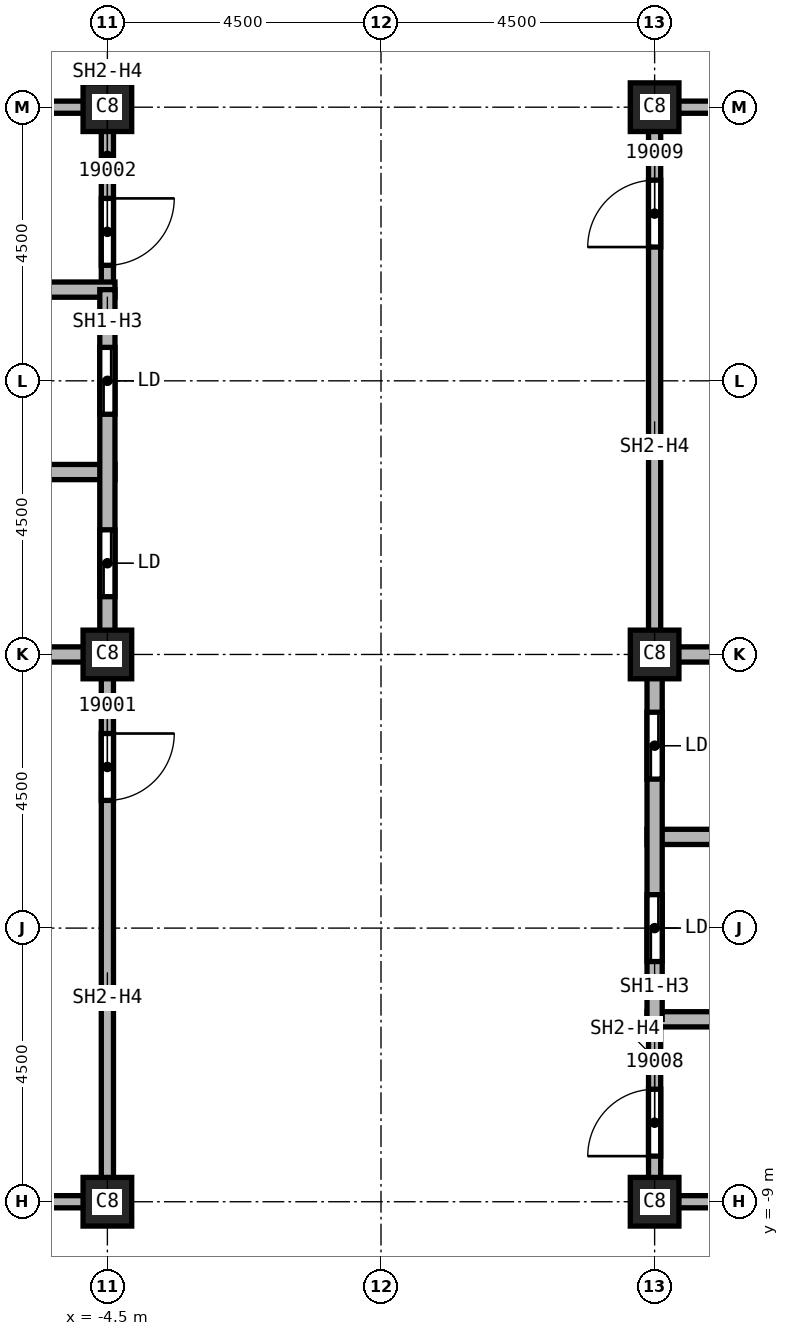
"""IFC4 building model, lengths in metres.
Left out: names, types, materials, properties, quantities, classifications, styles, units other than length and angle.
Written with IfcOpenShell. Run it as: python <this file> out.ifc"""

import sys

from ifc_helpers import new_model, si_unit, direction, frame, frame_2d, origin, origin_2d, place, context, subcontext, project, spatial, rectangle, extrude, element, fill, save


model = new_model("IFC4")
c1 = context("Model", 3, precision=1e-05, world=origin(), true_north=direction((0.0, 1.0)))
c2 = subcontext(c1, "Body", "Model", "MODEL_VIEW")
j1 = project(units=[si_unit("LENGTHUNIT", "METRE"), si_unit("PLANEANGLEUNIT", "RADIAN")], contexts=[c1])
p1 = place(None, origin())
s1 = spatial("IfcSite", under=j1, at=p1, CompositionType="ELEMENT")
p2 = place(p1, origin())
s2 = spatial("IfcBuilding", under=s1, at=p2, CompositionType="ELEMENT")
p3 = place(p2, frame((0.0, 0.0, 278.0)))
s3 = spatial("IfcBuildingStorey", under=s2, at=p3, CompositionType="ELEMENT", Elevation=278.0)
for number, where, z_axis, x_axis in (
    (1, (4.5, 0.0, 0.0), (0.0, 0.0, 1.0), (1.0, 0.0, 0.0)),
    (2, (4.5, 9.0, 0.0), (0.0, 0.0, 1.0), (1.0, 0.0, 0.0)),
    (3, (4.5, -9.0, 0.0), (0.0, 0.0, 1.0), (1.0, 0.0, 0.0)),
    (4, (-4.5, 0.0, 0.0), (0.0, 0.0, 1.0), (1.0, 0.0, 0.0)),
    (5, (-4.5, 9.0, 0.0), (0.0, 0.0, 1.0), (1.0, 0.0, 0.0)),
    (6, (-4.5, -9.0, 0.0), (0.0, 0.0, 1.0), (1.0, 0.0, 0.0)),
):
    element("IfcColumn", number, at=place(p3, frame(where, z_axis=z_axis, x_axis=x_axis)), inside=s3, PredefinedType="COLUMN", context=c2, shape_type="SweptSolid", body=[
        extrude(rectangle(XDim=0.8, YDim=0.8, at=origin_2d()), origin(), (0.0, 0.0, 1.0), 3.72),
    ])
for number, where, z_axis, x_axis in (
    (7, (-7.5, 9.0, 0.0), (0.0, 0.0, 1.0), (1.0, 0.0, 0.0)),
    (8, (-4.5, -9.0, 0.0), (0.0, 0.0, 1.0), (-1.0, 0.0, 0.0)),
):
    element("IfcWall", number, at=place(p3, frame(where, z_axis=z_axis, x_axis=x_axis)), inside=s3, PredefinedType="SOLIDWALL", context=c2, shape_type="SweptSolid", body=[
        extrude(rectangle(XDim=3.0, YDim=0.2, at=frame_2d((1.5, 0.0))), origin(), (0.0, 0.0, 1.0), 3.042),
    ])
p4 = place(p3, frame((-4.5, 0.0, 0.0), z_axis=(0.0, 0.0, 1.0), x_axis=(0.0, -1.0, 0.0)))
e9 = element("IfcWall", 9, at=p4, inside=s3, PredefinedType="SOLIDWALL", context=c2, shape_type="SweptSolid", body=[
    extrude(rectangle(XDim=9.1, YDim=0.2, at=frame_2d((4.55, 0.0))), origin(), (0.0, 0.0, 1.0), 3.042),
])
p5 = place(p4, frame((1.3, 0.0, 0.0)))
e10 = element("IfcOpeningElement", 10, at=p5, cuts=e9, PredefinedType="OPENING", context=c2, shape_type="SweptSolid", body=[
    extrude(rectangle(XDim=1.1, YDim=2.1, at=frame_2d((0.55, 1.05))), frame((0.0, 0.1, 0.0), z_axis=(0.0, -1.0, 0.0), x_axis=(1.0, 0.0, 0.0)), (0.0, 0.0, 1.0), 0.2),
])
p6 = place(p3, frame((-4.5, 9.1, 0.0), z_axis=(0.0, 0.0, 1.0), x_axis=(0.0, -1.0, 0.0)))
e11 = element("IfcWall", 11, at=p6, inside=s3, PredefinedType="SOLIDWALL", context=c2, shape_type="SweptSolid", body=[
    extrude(rectangle(XDim=3.1, YDim=0.2, at=frame_2d((1.55, 0.0))), origin(), (0.0, 0.0, 1.0), 3.042),
])
p7 = place(p6, frame((1.6, 0.0, 0.0)))
e12 = element("IfcOpeningElement", 12, at=p7, cuts=e11, PredefinedType="OPENING", context=c2, shape_type="SweptSolid", body=[
    extrude(rectangle(XDim=1.1, YDim=2.1, at=frame_2d((0.55, 1.05))), frame((0.0, 0.1, 0.0), z_axis=(0.0, -1.0, 0.0), x_axis=(1.0, 0.0, 0.0)), (0.0, 0.0, 1.0), 0.2),
])
p8 = place(p3, frame((4.5, -9.1, 0.0), z_axis=(0.0, 0.0, 1.0), x_axis=(0.0, 1.0, 0.0)))
e13 = element("IfcWall", 13, at=p8, inside=s3, PredefinedType="SOLIDWALL", context=c2, shape_type="SweptSolid", body=[
    extrude(rectangle(XDim=3.1, YDim=0.2, at=frame_2d((1.55, 0.0))), origin(), (0.0, 0.0, 1.0), 3.042),
])
p9 = place(p8, frame((0.85, 0.0, 0.0)))
e14 = element("IfcOpeningElement", 14, at=p9, cuts=e13, PredefinedType="OPENING", context=c2, shape_type="SweptSolid", body=[
    extrude(rectangle(XDim=1.1, YDim=2.1, at=frame_2d((0.55, 1.05))), frame((0.0, 0.1, 0.0), z_axis=(0.0, -1.0, 0.0), x_axis=(1.0, 0.0, 0.0)), (0.0, 0.0, 1.0), 0.2),
])
p10 = place(p3, frame((4.5, 0.0, 0.0), z_axis=(0.0, 0.0, 1.0), x_axis=(0.0, 1.0, 0.0)))
e15 = element("IfcWall", 15, at=p10, inside=s3, PredefinedType="SOLIDWALL", context=c2, shape_type="SweptSolid", body=[
    extrude(rectangle(XDim=9.1, YDim=0.2, at=frame_2d((4.55, 0.0))), origin(), (0.0, 0.0, 1.0), 3.042),
])
p11 = place(p10, frame((6.7, 0.0, 0.0)))
e16 = element("IfcOpeningElement", 16, at=p11, cuts=e15, PredefinedType="OPENING", context=c2, shape_type="SweptSolid", body=[
    extrude(rectangle(XDim=1.1, YDim=2.1, at=frame_2d((0.55, 1.05))), frame((0.0, 0.1, 0.0), z_axis=(0.0, -1.0, 0.0), x_axis=(1.0, 0.0, 0.0)), (0.0, 0.0, 1.0), 0.2),
])
for number, where, z_axis, x_axis in (
    (17, (4.5, 9.0, 0.0), (0.0, 0.0, 1.0), (1.0, 0.0, 0.0)),
    (18, (7.5, -9.0, 0.0), (0.0, 0.0, 1.0), (-1.0, 0.0, 0.0)),
):
    element("IfcWall", number, at=place(p3, frame(where, z_axis=z_axis, x_axis=x_axis)), inside=s3, PredefinedType="SOLIDWALL", context=c2, shape_type="SweptSolid", body=[
        extrude(rectangle(XDim=3.0, YDim=0.2, at=frame_2d((1.5, 0.0))), origin(), (0.0, 0.0, 1.0), 3.042),
    ])
p12 = place(p3, frame((-13.625, 3.0, 0.0), z_axis=(0.0, 0.0, 1.0), x_axis=(1.0, 0.0, 0.0)))
e19 = element("IfcWall", 19, at=p12, inside=s3, PredefinedType="SOLIDWALL", context=c2, shape_type="SweptSolid", body=[
    extrude(rectangle(XDim=9.25, YDim=0.25, at=frame_2d((4.625, 0.0))), origin(), (0.0, 0.0, 1.0), 3.72),
])
p13 = place(p12, frame((3.25, 0.0, 0.0)))
e20 = element("IfcOpeningElement", 20, at=p13, cuts=e19, PredefinedType="OPENING", context=c2, shape_type="SweptSolid", body=[
    extrude(rectangle(XDim=1.1, YDim=2.1, at=frame_2d((0.55, 1.05))), frame((0.0, 0.125, 0.0), z_axis=(0.0, -1.0, 0.0), x_axis=(1.0, 0.0, 0.0)), (0.0, 0.0, 1.0), 0.25),
])
for number, where, z_axis, x_axis in (
    (21, (-7.625, 0.0, 0.0), (0.0, 0.0, 1.0), (1.0, 0.0, 0.0)),
    (22, (-7.625, 6.0, 0.0), (0.0, 0.0, 1.0), (1.0, 0.0, 0.0)),
):
    element("IfcWall", number, at=place(p3, frame(where, z_axis=z_axis, x_axis=x_axis)), inside=s3, PredefinedType="SOLIDWALL", context=c2, shape_type="SweptSolid", body=[
        extrude(rectangle(XDim=3.25, YDim=0.25, at=frame_2d((1.625, 0.0))), origin(), (0.0, 0.0, 1.0), 3.72),
    ])
p14 = place(p3, frame((-4.5, 6.0, 0.0), z_axis=(0.0, 0.0, 1.0), x_axis=(0.0, -1.0, 0.0)))
e23 = element("IfcWall", 23, at=p14, inside=s3, PredefinedType="SOLIDWALL", context=c2, shape_type="SweptSolid", body=[
    extrude(rectangle(XDim=6.0, YDim=0.25, at=frame_2d((3.0, 0.0))), origin(), (0.0, 0.0, 1.0), 3.042),
])
p15 = place(p14, frame((3.95, 0.0, 0.0)))
e24 = element("IfcOpeningElement", 24, at=p15, cuts=e23, PredefinedType="OPENING", context=c2, shape_type="SweptSolid", body=[
    extrude(rectangle(XDim=1.1, YDim=2.1, at=frame_2d((0.55, 1.05))), frame((0.0, 0.125, 0.0), z_axis=(0.0, -1.0, 0.0), x_axis=(1.0, 0.0, 0.0)), (0.0, 0.0, 1.0), 0.25),
])
p16 = place(p14, frame((0.95, 0.0, 0.0)))
e25 = element("IfcOpeningElement", 25, at=p16, cuts=e23, PredefinedType="OPENING", context=c2, shape_type="SweptSolid", body=[
    extrude(rectangle(XDim=1.1, YDim=2.1, at=frame_2d((0.55, 1.05))), frame((0.0, 0.125, 0.0), z_axis=(0.0, -1.0, 0.0), x_axis=(1.0, 0.0, 0.0)), (0.0, 0.0, 1.0), 0.25),
])
p17 = place(p3, frame((4.375, -6.0, 0.0), z_axis=(0.0, 0.0, 1.0), x_axis=(1.0, 0.0, 0.0)))
e26 = element("IfcWall", 26, at=p17, inside=s3, PredefinedType="SOLIDWALL", context=c2, shape_type="SweptSolid", body=[
    extrude(rectangle(XDim=3.25, YDim=0.25, at=frame_2d((1.625, 0.0))), origin(), (0.0, 0.0, 1.0), 3.72),
])
p18 = place(p3, frame((4.375, -3.0, 0.0), z_axis=(0.0, 0.0, 1.0), x_axis=(1.0, 0.0, 0.0)))
e27 = element("IfcWall", 27, at=p18, inside=s3, PredefinedType="SOLIDWALL", context=c2, shape_type="SweptSolid", body=[
    extrude(rectangle(XDim=9.25, YDim=0.25, at=frame_2d((4.625, 0.0))), origin(), (0.0, 0.0, 1.0), 3.72),
])
p19 = place(p18, frame((4.875, 0.0, 0.0)))
e28 = element("IfcOpeningElement", 28, at=p19, cuts=e27, PredefinedType="OPENING", context=c2, shape_type="SweptSolid", body=[
    extrude(rectangle(XDim=1.1, YDim=2.1, at=frame_2d((0.55, 1.05))), frame((0.0, 0.125, 0.0), z_axis=(0.0, -1.0, 0.0), x_axis=(1.0, 0.0, 0.0)), (0.0, 0.0, 1.0), 0.25),
])
p20 = place(p3, frame((4.375, 0.0, 0.0), z_axis=(0.0, 0.0, 1.0), x_axis=(1.0, 0.0, 0.0)))
e29 = element("IfcWall", 29, at=p20, inside=s3, PredefinedType="SOLIDWALL", context=c2, shape_type="SweptSolid", body=[
    extrude(rectangle(XDim=3.25, YDim=0.25, at=frame_2d((1.625, 0.0))), origin(), (0.0, 0.0, 1.0), 3.72),
])
p21 = place(p3, frame((4.5, -6.0, 0.0), z_axis=(0.0, 0.0, 1.0), x_axis=(0.0, 1.0, 0.0)))
e30 = element("IfcWall", 30, at=p21, inside=s3, PredefinedType="SOLIDWALL", context=c2, shape_type="SweptSolid", body=[
    extrude(rectangle(XDim=6.0, YDim=0.25, at=frame_2d((3.0, 0.0))), origin(), (0.0, 0.0, 1.0), 3.042),
])
p22 = place(p21, frame((0.95, 0.0, 0.0)))
e31 = element("IfcOpeningElement", 31, at=p22, cuts=e30, PredefinedType="OPENING", context=c2, shape_type="SweptSolid", body=[
    extrude(rectangle(XDim=1.1, YDim=2.1, at=frame_2d((0.55, 1.05))), frame((0.0, 0.125, 0.0), z_axis=(0.0, -1.0, 0.0), x_axis=(1.0, 0.0, 0.0)), (0.0, 0.0, 1.0), 0.25),
])
p23 = place(p21, frame((3.95, 0.0, 0.0)))
e32 = element("IfcOpeningElement", 32, at=p23, cuts=e30, PredefinedType="OPENING", context=c2, shape_type="SweptSolid", body=[
    extrude(rectangle(XDim=1.1, YDim=2.1, at=frame_2d((0.55, 1.05))), frame((0.0, 0.125, 0.0), z_axis=(0.0, -1.0, 0.0), x_axis=(1.0, 0.0, 0.0)), (0.0, 0.0, 1.0), 0.25),
])
p24 = place(p5, origin())
e33 = element("IfcDoor", 33, at=p24, inside=s3, OperationType="SINGLE_SWING_RIGHT", PredefinedType="DOOR", context=c2, shape_type="SweptSolid", body=[
    extrude(rectangle(XDim=1.1, YDim=2.1, at=frame_2d((0.55, 1.05))), frame((0.0, 0.025, 0.0), z_axis=(0.0, -1.0, 0.0), x_axis=(1.0, 0.0, 0.0)), (0.0, 0.0, 1.0), 0.05),
])
fill(e10, e33)
p25 = place(p7, origin())
e34 = element("IfcDoor", 34, at=p25, inside=s3, OperationType="SINGLE_SWING_LEFT", PredefinedType="DOOR", context=c2, shape_type="SweptSolid", body=[
    extrude(rectangle(XDim=1.1, YDim=2.1, at=frame_2d((0.55, 1.05))), frame((0.0, 0.025, 0.0), z_axis=(0.0, -1.0, 0.0), x_axis=(1.0, 0.0, 0.0)), (0.0, 0.0, 1.0), 0.05),
])
fill(e12, e34)
p26 = place(p9, origin())
e35 = element("IfcDoor", 35, at=p26, inside=s3, OperationType="SINGLE_SWING_LEFT", PredefinedType="DOOR", context=c2, shape_type="SweptSolid", body=[
    extrude(rectangle(XDim=1.1, YDim=2.1, at=frame_2d((0.55, 1.05))), frame((0.0, 0.025, 0.0), z_axis=(0.0, -1.0, 0.0), x_axis=(1.0, 0.0, 0.0)), (0.0, 0.0, 1.0), 0.05),
])
fill(e14, e35)
p27 = place(p11, origin())
e36 = element("IfcDoor", 36, at=p27, inside=s3, OperationType="SINGLE_SWING_RIGHT", PredefinedType="DOOR", context=c2, shape_type="SweptSolid", body=[
    extrude(rectangle(XDim=1.1, YDim=2.1, at=frame_2d((0.55, 1.05))), frame((0.0, 0.025, 0.0), z_axis=(0.0, -1.0, 0.0), x_axis=(1.0, 0.0, 0.0)), (0.0, 0.0, 1.0), 0.05),
])
fill(e16, e36)
p28 = place(p15, origin())
e37 = element("IfcDoor", 37, at=p28, inside=s3, OperationType="SLIDING_TO_LEFT", PredefinedType="DOOR", context=c2, shape_type="SweptSolid", body=[
    extrude(rectangle(XDim=1.1, YDim=2.1, at=frame_2d((0.55, 1.05))), frame((0.0, 0.025, 0.0), z_axis=(0.0, -1.0, 0.0), x_axis=(1.0, 0.0, 0.0)), (0.0, 0.0, 1.0), 0.05),
])
fill(e24, e37)
p29 = place(p16, origin())
e38 = element("IfcDoor", 38, at=p29, inside=s3, OperationType="SLIDING_TO_LEFT", PredefinedType="DOOR", context=c2, shape_type="SweptSolid", body=[
    extrude(rectangle(XDim=1.1, YDim=2.1, at=frame_2d((0.55, 1.05))), frame((0.0, 0.025, 0.0), z_axis=(0.0, -1.0, 0.0), x_axis=(1.0, 0.0, 0.0)), (0.0, 0.0, 1.0), 0.05),
])
fill(e25, e38)
p30 = place(p22, origin())
e39 = element("IfcDoor", 39, at=p30, inside=s3, OperationType="SLIDING_TO_LEFT", PredefinedType="DOOR", context=c2, shape_type="SweptSolid", body=[
    extrude(rectangle(XDim=1.1, YDim=2.1, at=frame_2d((0.55, 1.05))), frame((0.0, 0.025, 0.0), z_axis=(0.0, -1.0, 0.0), x_axis=(1.0, 0.0, 0.0)), (0.0, 0.0, 1.0), 0.05),
])
fill(e31, e39)
p31 = place(p23, origin())
e40 = element("IfcDoor", 40, at=p31, inside=s3, OperationType="SLIDING_TO_LEFT", PredefinedType="DOOR", context=c2, shape_type="SweptSolid", body=[
    extrude(rectangle(XDim=1.1, YDim=2.1, at=frame_2d((0.55, 1.05))), frame((0.0, 0.025, 0.0), z_axis=(0.0, -1.0, 0.0), x_axis=(1.0, 0.0, 0.0)), (0.0, 0.0, 1.0), 0.05),
])
fill(e32, e40)
save(model, sys.argv[1])
